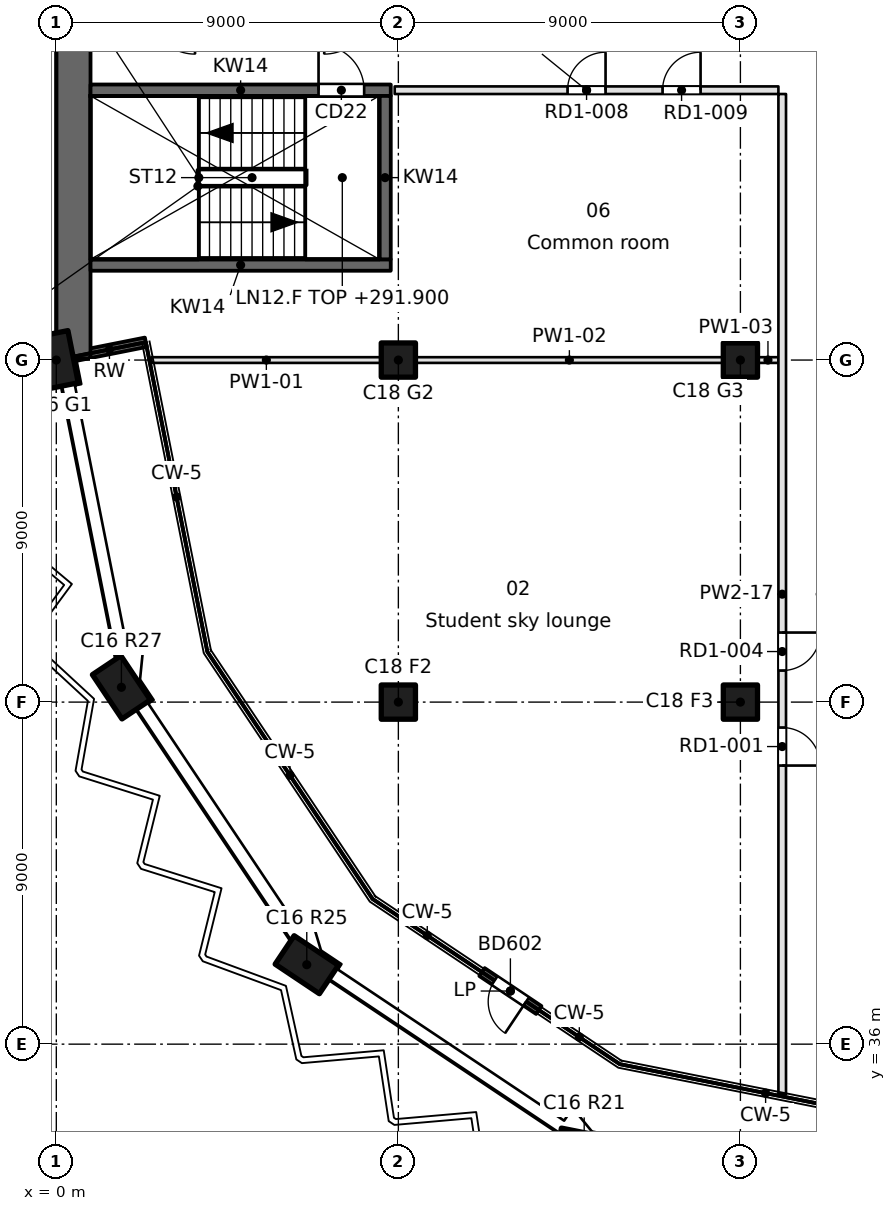
"""IFC4 building model, lengths in metres.
Left out: names, types, materials, properties, quantities, classifications, styles, units other than length and angle.
Written with IfcOpenShell. Run it as: python <this file> out.ifc"""

import sys

from ifc_helpers import new_model, si_unit, direction, frame, frame_2d, origin, origin_2d, place, context, subcontext, project, spatial, rectangle, extrude, element, fill, save


model = new_model("IFC4")
c1 = context("Model", 3, precision=1e-05, world=origin(), true_north=direction((0.0, 1.0)))
c2 = subcontext(c1, "Body", "Model", "MODEL_VIEW")
j1 = project(units=[si_unit("LENGTHUNIT", "METRE"), si_unit("PLANEANGLEUNIT", "RADIAN")], contexts=[c1])
p1 = place(None, origin())
s1 = spatial("IfcSite", under=j1, at=p1, CompositionType="ELEMENT")
p2 = place(p1, origin())
s2 = spatial("IfcBuilding", under=s1, at=p2, CompositionType="ELEMENT")
p3 = place(p2, frame((0.0, 0.0, 291.9)))
s3 = spatial("IfcBuildingStorey", under=s2, at=p3, CompositionType="ELEMENT", Elevation=291.9)
for number, where, z_axis, x_axis in (
    (1, (13.89, 33.213, 0.0), (0.0, 0.0, 1.0), (-0.981, 0.195, 0.0)),
    (2, (6.59, 38.09, 0.0), (0.0, 0.0, 1.0), (-0.831, 0.556, 0.0)),
    (3, (1.713, 45.39, 0.0), (0.0, 0.0, 1.0), (-0.556, 0.831, 0.0)),
    (4, (0.0, 54.0, 0.0), (0.0, 0.0, 1.0), (-0.195, 0.981, 0.0)),
):
    element("IfcColumn", number, at=place(p3, frame(where, z_axis=z_axis, x_axis=x_axis)), inside=s3, PredefinedType="COLUMN", context=c2, shape_type="SweptSolid", body=[
        extrude(rectangle(XDim=1.4, YDim=0.9, at=origin_2d()), origin(), (0.0, 0.0, 1.0), 3.7),
    ])
for number, where, z_axis, x_axis in (
    (5, (9.0, 45.0, 0.0), (0.0, 0.0, 1.0), (1.0, 0.0, 0.0)),
    (6, (9.0, 54.0, 0.0), (0.0, 0.0, 1.0), (1.0, 0.0, 0.0)),
    (7, (18.0, 45.0, 0.0), (0.0, 0.0, 1.0), (1.0, 0.0, 0.0)),
    (8, (18.0, 54.0, 0.0), (0.0, 0.0, 1.0), (1.0, 0.0, 0.0)),
):
    element("IfcColumn", number, at=place(p3, frame(where, z_axis=z_axis, x_axis=x_axis)), inside=s3, PredefinedType="COLUMN", context=c2, shape_type="SweptSolid", body=[
        extrude(rectangle(XDim=0.9, YDim=0.9, at=origin_2d()), origin(), (0.0, 0.0, 1.0), 3.7),
    ])
p4 = place(p3, frame((0.45, 94.5, 0.0), z_axis=(0.0, 0.0, 1.0), x_axis=(0.0, -1.0, 0.0)))
e9 = element("IfcWall", 9, at=p4, inside=s3, PredefinedType="SHEAR", context=c2, shape_type="SweptSolid", body=[
    extrude(rectangle(XDim=40.456, YDim=0.9, at=frame_2d((20.228, 0.0))), origin(), (0.0, 0.0, 1.0), 3.7),
])
p5 = place(p3, frame((0.441, 54.089, 0.0), z_axis=(0.0, 0.0, 1.0), x_axis=(0.980834936053, 0.194840519958, 0.0)))
e10 = element("IfcWall", 10, at=p5, inside=s3, PredefinedType="SOLIDWALL", context=c2, shape_type="SweptSolid", body=[
    extrude(rectangle(XDim=1.951, YDim=0.25, at=frame_2d((0.976, 0.0))), origin(), (0.0, 0.0, 1.0), 3.3),
])
p6 = place(p3, frame((11.2, 37.898, 0.0), z_axis=(0.0, 0.0, 1.0), x_axis=(0.83146554274, -0.555576323502, 0.0)))
e11 = element("IfcWall", 11, at=p6, inside=s3, PredefinedType="SOLIDWALL", context=c2, shape_type="SweptSolid", body=[
    extrude(rectangle(XDim=1.8, YDim=0.25, at=frame_2d((0.9, 0.0))), origin(), (0.0, 0.0, 1.0), 3.3),
])
p7 = place(p6, frame((0.4, 0.0, 0.0)))
e12 = element("IfcOpeningElement", 12, at=p7, cuts=e11, PredefinedType="OPENING", context=c2, shape_type="SweptSolid", body=[
    extrude(rectangle(XDim=1.0, YDim=2.1, at=frame_2d((0.5, 1.05))), frame((0.0, 0.125, 0.0), z_axis=(0.0, -1.0, 0.0), x_axis=(1.0, 0.0, 0.0)), (0.0, 0.0, 1.0), 0.25),
])
p8 = place(p3, frame((0.9, 56.5, -0.4), z_axis=(0.0, 0.0, 1.0), x_axis=(1.0, 0.0, 0.0)))
e13 = element("IfcWall", 13, at=p8, inside=s3, PredefinedType="SOLIDWALL", context=c2, shape_type="SweptSolid", body=[
    extrude(rectangle(XDim=7.9, YDim=0.3, at=frame_2d((3.95, 0.0))), origin(), (0.0, 0.0, 1.0), 3.7),
])
p9 = place(p3, frame((0.9, 61.1, -0.4), z_axis=(0.0, 0.0, 1.0), x_axis=(1.0, 0.0, 0.0)))
e14 = element("IfcWall", 14, at=p9, inside=s3, PredefinedType="SOLIDWALL", context=c2, shape_type="SweptSolid", body=[
    extrude(rectangle(XDim=7.9, YDim=0.3, at=frame_2d((3.95, 0.0))), origin(), (0.0, 0.0, 1.0), 3.7),
])
p10 = place(p9, frame((6.0, 0.0, 0.4)))
e15 = element("IfcOpeningElement", 15, at=p10, cuts=e14, PredefinedType="OPENING", context=c2, shape_type="SweptSolid", body=[
    extrude(rectangle(XDim=1.2, YDim=2.1, at=frame_2d((0.6, 1.05))), frame((0.0, 0.15, 0.0), z_axis=(0.0, -1.0, 0.0), x_axis=(1.0, 0.0, 0.0)), (0.0, 0.0, 1.0), 0.3),
])
p11 = place(p3, frame((8.65, 56.65, -0.4), z_axis=(0.0, 0.0, 1.0), x_axis=(0.0, 1.0, 0.0)))
e16 = element("IfcWall", 16, at=p11, inside=s3, PredefinedType="SOLIDWALL", context=c2, shape_type="SweptSolid", body=[
    extrude(rectangle(XDim=4.3, YDim=0.3, at=frame_2d((2.15, 0.0))), origin(), (0.0, 0.0, 1.0), 3.7),
])
p12 = place(p3, frame((2.503, 54.0, 0.0), z_axis=(0.0, 0.0, 1.0), x_axis=(1.0, 0.0, 0.0)))
e17 = element("IfcWall", 17, at=p12, inside=s3, PredefinedType="PARTITIONING", context=c2, shape_type="SweptSolid", body=[
    extrude(rectangle(XDim=6.047, YDim=0.15, at=frame_2d((3.023, 0.0))), origin(), (0.0, 0.0, 1.0), 3.3),
])
p13 = place(p3, frame((9.45, 54.0, 0.0), z_axis=(0.0, 0.0, 1.0), x_axis=(1.0, 0.0, 0.0)))
e18 = element("IfcWall", 18, at=p13, inside=s3, PredefinedType="PARTITIONING", context=c2, shape_type="SweptSolid", body=[
    extrude(rectangle(XDim=8.1, YDim=0.15, at=frame_2d((4.05, 0.0))), origin(), (0.0, 0.0, 1.0), 3.3),
])
p14 = place(p3, frame((18.45, 54.0, 0.0), z_axis=(0.0, 0.0, 1.0), x_axis=(1.0, 0.0, 0.0)))
e19 = element("IfcWall", 19, at=p14, inside=s3, PredefinedType="PARTITIONING", context=c2, shape_type="SweptSolid", body=[
    extrude(rectangle(XDim=0.55, YDim=0.15, at=frame_2d((0.275, 0.0))), origin(), (0.0, 0.0, 1.0), 3.3),
])
p15 = place(p3, frame((19.0, 61.1, 0.0), z_axis=(0.0, 0.0, 1.0), x_axis=(-1.0, 0.0, 0.0)))
e20 = element("IfcWall", 20, at=p15, inside=s3, PredefinedType="PARTITIONING", context=c2, shape_type="SweptSolid", body=[
    extrude(rectangle(XDim=10.096, YDim=0.2, at=frame_2d((5.048, 0.0))), origin(), (0.0, 0.0, 1.0), 3.3),
])
p16 = place(p15, frame((4.548, 0.0, 0.0)))
e21 = element("IfcOpeningElement", 21, at=p16, cuts=e20, PredefinedType="OPENING", context=c2, shape_type="SweptSolid", body=[
    extrude(rectangle(XDim=1.0, YDim=2.1, at=frame_2d((0.5, 1.05))), frame((0.0, 0.1, 0.0), z_axis=(0.0, -1.0, 0.0), x_axis=(1.0, 0.0, 0.0)), (0.0, 0.0, 1.0), 0.2),
])
p17 = place(p15, frame((2.048, 0.0, 0.0)))
e22 = element("IfcOpeningElement", 22, at=p17, cuts=e20, PredefinedType="OPENING", context=c2, shape_type="SweptSolid", body=[
    extrude(rectangle(XDim=1.0, YDim=2.1, at=frame_2d((0.5, 1.05))), frame((0.0, 0.1, 0.0), z_axis=(0.0, -1.0, 0.0), x_axis=(1.0, 0.0, 0.0)), (0.0, 0.0, 1.0), 0.2),
])
p18 = place(p3, frame((19.1, 34.679, 0.0), z_axis=(0.0, 0.0, 1.0), x_axis=(0.0, 1.0, 0.0)))
e23 = element("IfcWall", 23, at=p18, inside=s3, PredefinedType="PARTITIONING", context=c2, shape_type="SweptSolid", body=[
    extrude(rectangle(XDim=26.321, YDim=0.2, at=frame_2d((13.16, 0.0))), origin(), (0.0, 0.0, 1.0), 3.3),
])
p19 = place(p18, frame((8.651, 0.0, 0.0)))
e24 = element("IfcOpeningElement", 24, at=p19, cuts=e23, PredefinedType="OPENING", context=c2, shape_type="SweptSolid", body=[
    extrude(rectangle(XDim=1.0, YDim=2.1, at=frame_2d((0.5, 1.05))), frame((0.0, 0.1, 0.0), z_axis=(0.0, -1.0, 0.0), x_axis=(1.0, 0.0, 0.0)), (0.0, 0.0, 1.0), 0.2),
])
p20 = place(p18, frame((11.151, 0.0, 0.0)))
e25 = element("IfcOpeningElement", 25, at=p20, cuts=e23, PredefinedType="OPENING", context=c2, shape_type="SweptSolid", body=[
    extrude(rectangle(XDim=1.0, YDim=2.1, at=frame_2d((0.5, 1.05))), frame((0.0, 0.1, 0.0), z_axis=(0.0, -1.0, 0.0), x_axis=(1.0, 0.0, 0.0)), (0.0, 0.0, 1.0), 0.2),
])
p21 = place(p7, frame((1.0, 0.0, 0.0), z_axis=(0.0, 0.0, 1.0), x_axis=(-1.0, 0.0, 0.0)))
e26 = element("IfcDoor", 26, at=p21, inside=s3, OperationType="SINGLE_SWING_LEFT", PredefinedType="DOOR", context=c2, shape_type="SweptSolid", body=[
    extrude(rectangle(XDim=1.0, YDim=2.1, at=frame_2d((0.5, 1.05))), frame((0.0, 0.025, 0.0), z_axis=(0.0, -1.0, 0.0), x_axis=(1.0, 0.0, 0.0)), (0.0, 0.0, 1.0), 0.05),
])
fill(e12, e26)
p22 = place(p10, origin())
e27 = element("IfcDoor", 27, at=p22, inside=s3, OperationType="SINGLE_SWING_LEFT", PredefinedType="DOOR", context=c2, shape_type="SweptSolid", body=[
    extrude(rectangle(XDim=1.2, YDim=2.1, at=frame_2d((0.6, 1.05))), frame((0.0, 0.025, 0.0), z_axis=(0.0, -1.0, 0.0), x_axis=(1.0, 0.0, 0.0)), (0.0, 0.0, 1.0), 0.05),
])
fill(e15, e27)
p23 = place(p19, frame((1.0, 0.0, 0.0), z_axis=(0.0, 0.0, 1.0), x_axis=(-1.0, 0.0, 0.0)))
e28 = element("IfcDoor", 28, at=p23, inside=s3, OperationType="SINGLE_SWING_RIGHT", PredefinedType="DOOR", context=c2, shape_type="SweptSolid", body=[
    extrude(rectangle(XDim=1.0, YDim=2.1, at=frame_2d((0.5, 1.05))), frame((0.0, 0.025, 0.0), z_axis=(0.0, -1.0, 0.0), x_axis=(1.0, 0.0, 0.0)), (0.0, 0.0, 1.0), 0.05),
])
fill(e24, e28)
p24 = place(p20, frame((1.0, 0.0, 0.0), z_axis=(0.0, 0.0, 1.0), x_axis=(-1.0, 0.0, 0.0)))
e29 = element("IfcDoor", 29, at=p24, inside=s3, OperationType="SINGLE_SWING_LEFT", PredefinedType="DOOR", context=c2, shape_type="SweptSolid", body=[
    extrude(rectangle(XDim=1.0, YDim=2.1, at=frame_2d((0.5, 1.05))), frame((0.0, 0.025, 0.0), z_axis=(0.0, -1.0, 0.0), x_axis=(1.0, 0.0, 0.0)), (0.0, 0.0, 1.0), 0.05),
])
fill(e25, e29)
p25 = place(p16, frame((1.0, 0.0, 0.0), z_axis=(0.0, 0.0, 1.0), x_axis=(-1.0, 0.0, 0.0)))
e30 = element("IfcDoor", 30, at=p25, inside=s3, OperationType="SINGLE_SWING_RIGHT", PredefinedType="DOOR", context=c2, shape_type="SweptSolid", body=[
    extrude(rectangle(XDim=1.0, YDim=2.1, at=frame_2d((0.5, 1.05))), frame((0.0, 0.025, 0.0), z_axis=(0.0, -1.0, 0.0), x_axis=(1.0, 0.0, 0.0)), (0.0, 0.0, 1.0), 0.05),
])
fill(e21, e30)
p26 = place(p17, frame((1.0, 0.0, 0.0), z_axis=(0.0, 0.0, 1.0), x_axis=(-1.0, 0.0, 0.0)))
e31 = element("IfcDoor", 31, at=p26, inside=s3, OperationType="SINGLE_SWING_RIGHT", PredefinedType="DOOR", context=c2, shape_type="SweptSolid", body=[
    extrude(rectangle(XDim=1.0, YDim=2.1, at=frame_2d((0.5, 1.05))), frame((0.0, 0.025, 0.0), z_axis=(0.0, -1.0, 0.0), x_axis=(1.0, 0.0, 0.0)), (0.0, 0.0, 1.0), 0.05),
])
fill(e22, e31)
save(model, sys.argv[1])
